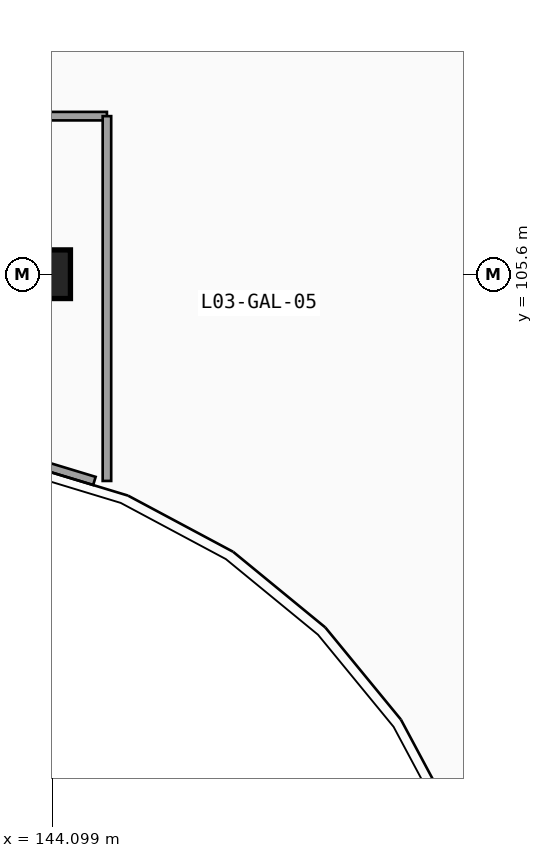
"""IFC4 building model, lengths in metres.
Left out: names, types, materials, properties, quantities, classifications, styles, units other than length and angle.
Written with IfcOpenShell. Run it as: python <this file> out.ifc"""

import sys

from ifc_helpers import new_model, si_unit, direction, frame, frame_2d, origin, origin_2d, place, context, subcontext, project, spatial, rectangle, extrude, element, save


model = new_model("IFC4")
c1 = context("Model", 3, precision=1e-05, world=origin(), true_north=direction((0.0, 1.0)))
c2 = subcontext(c1, "Body", "Model", "MODEL_VIEW")
j1 = project(units=[si_unit("LENGTHUNIT", "METRE"), si_unit("PLANEANGLEUNIT", "RADIAN")], contexts=[c1])
p1 = place(None, origin())
s1 = spatial("IfcSite", under=j1, at=p1, CompositionType="ELEMENT")
p2 = place(p1, origin())
s2 = spatial("IfcBuilding", under=s1, at=p2, CompositionType="ELEMENT")
p3 = place(p2, frame((0.0, 0.0, 14.1)))
s3 = spatial("IfcBuildingStorey", under=s2, at=p3, CompositionType="ELEMENT", Elevation=14.1)
p4 = place(p3, frame((144.0, 105.6, 0.0), z_axis=(0.0, 0.0, 1.0), x_axis=(1.0, 0.0, 0.0)))
e1 = element("IfcColumn", 1, at=p4, inside=s3, PredefinedType="COLUMN", context=c2, shape_type="SweptSolid", body=[
    extrude(rectangle(XDim=0.8, YDim=0.8, at=origin_2d()), origin(), (0.0, 0.0, 1.0), 4.5),
])
p5 = place(p3, frame((140.38, 108.2, 0.0), z_axis=(0.0, 0.0, 1.0), x_axis=(1.0, 0.0, 0.0)))
e2 = element("IfcWall", 2, at=p5, inside=s3, PredefinedType="PARTITIONING", context=c2, shape_type="SweptSolid", body=[
    extrude(rectangle(XDim=4.62, YDim=0.14, at=frame_2d((2.31, 0.0))), origin(), (0.0, 0.0, 1.0), 3.638),
])
p6 = place(p3, frame((145.0, 108.2, 0.0), z_axis=(0.0, 0.0, 1.0), x_axis=(0.0, -1.0, 0.0)))
e3 = element("IfcWall", 3, at=p6, inside=s3, PredefinedType="PARTITIONING", context=c2, shape_type="SweptSolid", body=[
    extrude(rectangle(XDim=6.0, YDim=0.14, at=frame_2d((3.0, 0.0))), origin(), (0.0, 0.0, 1.0), 3.556),
])
p7 = place(p3, frame((144.794, 102.2, 0.0), z_axis=(0.0, 0.0, 1.0), x_axis=(-0.956921766266, 0.290345885534, 0.0)))
e4 = element("IfcWall", 4, at=p7, inside=s3, PredefinedType="PARTITIONING", context=c2, shape_type="SweptSolid", body=[
    extrude(rectangle(XDim=1.441, YDim=0.14, at=frame_2d((0.721, 0.0))), origin(), (0.0, 0.0, 1.0), 4.24),
])
save(model, sys.argv[1])
